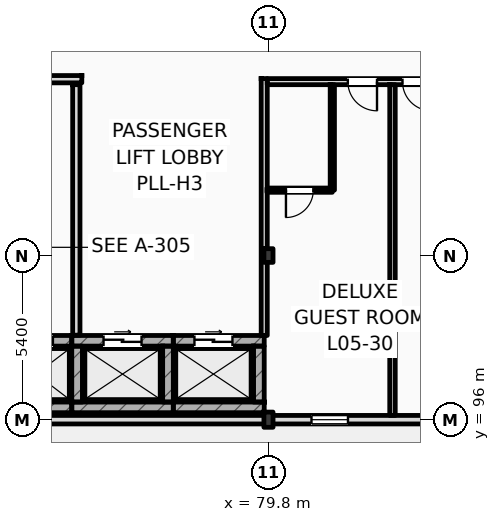
"""IFC4 building model, lengths in metres.
Left out: names, types, materials, properties, quantities, classifications, styles, units other than length and angle.
Written with IfcOpenShell. Run it as: python <this file> out.ifc"""

import sys

from ifc_helpers import new_model, si_unit, direction, frame, frame_2d, origin, origin_2d, place, context, subcontext, project, spatial, rectangle, i_section, extrude, element, fill, save


model = new_model("IFC4")
c1 = context("Model", 3, precision=1e-05, world=origin(), true_north=direction((0.0, 1.0)))
c2 = subcontext(c1, "Body", "Model", "MODEL_VIEW")
j1 = project(units=[si_unit("LENGTHUNIT", "METRE"), si_unit("PLANEANGLEUNIT", "RADIAN")], contexts=[c1])
p1 = place(None, origin())
s1 = spatial("IfcSite", under=j1, at=p1, CompositionType="ELEMENT")
p2 = place(p1, origin())
s2 = spatial("IfcBuilding", under=s1, at=p2, CompositionType="ELEMENT")
p3 = place(p2, frame((0.0, 0.0, 24.6)))
s3 = spatial("IfcBuildingStorey", under=s2, at=p3, CompositionType="ELEMENT", Elevation=24.6)
p4 = place(p3, frame((79.8, 96.0, 0.0), z_axis=(0.0, 0.0, 1.0), x_axis=(1.0, 0.0, 0.0)))
e1 = element("IfcColumn", 1, at=p4, inside=s3, PredefinedType="COLUMN", context=c2, shape_type="SweptSolid", body=[
    extrude(i_section(OverallWidth=0.3, OverallDepth=0.5, WebThickness=0.014, FlangeThickness=0.028, FilletRadius=0.027, at=origin_2d()), origin(), (0.0, 0.0, 1.0), 3.6),
])
p5 = place(p3, frame((79.8, 101.4, 0.0), z_axis=(0.0, 0.0, 1.0), x_axis=(1.0, 0.0, 0.0)))
e2 = element("IfcColumn", 2, at=p5, inside=s3, PredefinedType="COLUMN", context=c2, shape_type="SweptSolid", body=[
    extrude(i_section(OverallWidth=0.3, OverallDepth=0.45, WebThickness=0.014, FlangeThickness=0.026, FilletRadius=0.027, at=origin_2d()), origin(), (0.0, 0.0, 1.0), 3.6),
])
p6 = place(p3, frame((25.2, 96.0, 0.0), z_axis=(0.0, 0.0, 1.0), x_axis=(1.0, 0.0, 0.0)))
e3 = element("IfcWall", 3, at=p6, inside=s3, PredefinedType="STANDARD", context=c2, shape_type="SweptSolid", body=[
    extrude(rectangle(XDim=94.8, YDim=0.28, at=frame_2d((47.4, 0.0))), origin(), (0.0, 0.0, 1.0), 2.78),
])
p7 = place(p6, frame((16.539, 0.0, 0.9)))
e4 = element("IfcOpeningElement", 4, at=p7, cuts=e3, PredefinedType="OPENING", context=c2, shape_type="SweptSolid", body=[
    extrude(rectangle(XDim=1.75, YDim=1.7, at=frame_2d((0.875, 0.85))), frame((0.0, 0.15, 0.0), z_axis=(0.0, -1.0, 0.0), x_axis=(1.0, 0.0, 0.0)), (0.0, 0.0, 1.0), 0.3),
])
p8 = place(p6, frame((20.367, 0.0, 0.9)))
e5 = element("IfcOpeningElement", 5, at=p8, cuts=e3, PredefinedType="OPENING", context=c2, shape_type="SweptSolid", body=[
    extrude(rectangle(XDim=2.0, YDim=1.7, at=frame_2d((1.0, 0.85))), frame((0.0, 0.15, 0.0), z_axis=(0.0, -1.0, 0.0), x_axis=(1.0, 0.0, 0.0)), (0.0, 0.0, 1.0), 0.3),
])
p9 = place(p6, frame((24.326, 0.0, 0.9)))
e6 = element("IfcOpeningElement", 6, at=p9, cuts=e3, PredefinedType="OPENING", context=c2, shape_type="SweptSolid", body=[
    extrude(rectangle(XDim=2.3, YDim=1.7, at=frame_2d((1.15, 0.85))), frame((0.0, 0.15, 0.0), z_axis=(0.0, -1.0, 0.0), x_axis=(1.0, 0.0, 0.0)), (0.0, 0.0, 1.0), 0.3),
])
p10 = place(p6, frame((27.684, 0.0, 0.9)))
e7 = element("IfcOpeningElement", 7, at=p10, cuts=e3, PredefinedType="OPENING", context=c2, shape_type="SweptSolid", body=[
    extrude(rectangle(XDim=2.6, YDim=1.7, at=frame_2d((1.3, 0.85))), frame((0.0, 0.15, 0.0), z_axis=(0.0, -1.0, 0.0), x_axis=(1.0, 0.0, 0.0)), (0.0, 0.0, 1.0), 0.3),
])
p11 = place(p6, frame((32.083, 0.0, 0.9)))
e8 = element("IfcOpeningElement", 8, at=p11, cuts=e3, PredefinedType="OPENING", context=c2, shape_type="SweptSolid", body=[
    extrude(rectangle(XDim=2.419, YDim=1.7, at=frame_2d((1.209, 0.85))), frame((0.0, 0.15, 0.0), z_axis=(0.0, -1.0, 0.0), x_axis=(1.0, 0.0, 0.0)), (0.0, 0.0, 1.0), 0.3),
])
p12 = place(p6, frame((35.322, 0.0, 0.9)))
e9 = element("IfcOpeningElement", 9, at=p12, cuts=e3, PredefinedType="OPENING", context=c2, shape_type="SweptSolid", body=[
    extrude(rectangle(XDim=2.868, YDim=1.7, at=frame_2d((1.434, 0.85))), frame((0.0, 0.15, 0.0), z_axis=(0.0, -1.0, 0.0), x_axis=(1.0, 0.0, 0.0)), (0.0, 0.0, 1.0), 0.3),
])
p13 = place(p6, frame((56.015, 0.0, 0.9)))
e10 = element("IfcOpeningElement", 10, at=p13, cuts=e3, PredefinedType="OPENING", context=c2, shape_type="SweptSolid", body=[
    extrude(rectangle(XDim=1.2, YDim=1.7, at=frame_2d((0.6, 0.85))), frame((0.0, 0.15, 0.0), z_axis=(0.0, -1.0, 0.0), x_axis=(1.0, 0.0, 0.0)), (0.0, 0.0, 1.0), 0.3),
])
p14 = place(p6, frame((59.888, 0.0, 0.9)))
e11 = element("IfcOpeningElement", 11, at=p14, cuts=e3, PredefinedType="OPENING", context=c2, shape_type="SweptSolid", body=[
    extrude(rectangle(XDim=1.35, YDim=1.7, at=frame_2d((0.675, 0.85))), frame((0.0, 0.15, 0.0), z_axis=(0.0, -1.0, 0.0), x_axis=(1.0, 0.0, 0.0)), (0.0, 0.0, 1.0), 0.3),
])
p15 = place(p6, frame((63.799, 0.0, 0.9)))
e12 = element("IfcOpeningElement", 12, at=p15, cuts=e3, PredefinedType="OPENING", context=c2, shape_type="SweptSolid", body=[
    extrude(rectangle(XDim=1.5, YDim=1.7, at=frame_2d((0.75, 0.85))), frame((0.0, 0.15, 0.0), z_axis=(0.0, -1.0, 0.0), x_axis=(1.0, 0.0, 0.0)), (0.0, 0.0, 1.0), 0.3),
])
p16 = place(p6, frame((67.709, 0.0, 0.9)))
e13 = element("IfcOpeningElement", 13, at=p16, cuts=e3, PredefinedType="OPENING", context=c2, shape_type="SweptSolid", body=[
    extrude(rectangle(XDim=1.65, YDim=1.7, at=frame_2d((0.825, 0.85))), frame((0.0, 0.15, 0.0), z_axis=(0.0, -1.0, 0.0), x_axis=(1.0, 0.0, 0.0)), (0.0, 0.0, 1.0), 0.3),
])
p17 = place(p6, frame((71.618, 0.0, 0.9)))
e14 = element("IfcOpeningElement", 14, at=p17, cuts=e3, PredefinedType="OPENING", context=c2, shape_type="SweptSolid", body=[
    extrude(rectangle(XDim=1.8, YDim=1.7, at=frame_2d((0.9, 0.85))), frame((0.0, 0.15, 0.0), z_axis=(0.0, -1.0, 0.0), x_axis=(1.0, 0.0, 0.0)), (0.0, 0.0, 1.0), 0.3),
])
p18 = place(p6, frame((75.129, 0.0, 0.9)))
e15 = element("IfcOpeningElement", 15, at=p18, cuts=e3, PredefinedType="OPENING", context=c2, shape_type="SweptSolid", body=[
    extrude(rectangle(XDim=1.95, YDim=1.7, at=frame_2d((0.975, 0.85))), frame((0.0, 0.15, 0.0), z_axis=(0.0, -1.0, 0.0), x_axis=(1.0, 0.0, 0.0)), (0.0, 0.0, 1.0), 0.3),
])
p19 = place(p6, frame((79.439, 0.0, 0.9)))
e16 = element("IfcOpeningElement", 16, at=p19, cuts=e3, PredefinedType="OPENING", context=c2, shape_type="SweptSolid", body=[
    extrude(rectangle(XDim=2.1, YDim=1.7, at=frame_2d((1.05, 0.85))), frame((0.0, 0.15, 0.0), z_axis=(0.0, -1.0, 0.0), x_axis=(1.0, 0.0, 0.0)), (0.0, 0.0, 1.0), 0.3),
])
p20 = place(p6, frame((83.349, 0.0, 0.9)))
e17 = element("IfcOpeningElement", 17, at=p20, cuts=e3, PredefinedType="OPENING", context=c2, shape_type="SweptSolid", body=[
    extrude(rectangle(XDim=2.25, YDim=1.7, at=frame_2d((1.125, 0.85))), frame((0.0, 0.15, 0.0), z_axis=(0.0, -1.0, 0.0), x_axis=(1.0, 0.0, 0.0)), (0.0, 0.0, 1.0), 0.3),
])
p21 = place(p6, frame((87.258, 0.0, 0.9)))
e18 = element("IfcOpeningElement", 18, at=p21, cuts=e3, PredefinedType="OPENING", context=c2, shape_type="SweptSolid", body=[
    extrude(rectangle(XDim=2.4, YDim=1.7, at=frame_2d((1.2, 0.85))), frame((0.0, 0.15, 0.0), z_axis=(0.0, -1.0, 0.0), x_axis=(1.0, 0.0, 0.0)), (0.0, 0.0, 1.0), 0.3),
])
p22 = place(p6, frame((91.204, 0.0, 0.9)))
e19 = element("IfcOpeningElement", 19, at=p22, cuts=e3, PredefinedType="OPENING", context=c2, shape_type="SweptSolid", body=[
    extrude(rectangle(XDim=2.55, YDim=1.7, at=frame_2d((1.275, 0.85))), frame((0.0, 0.15, 0.0), z_axis=(0.0, -1.0, 0.0), x_axis=(1.0, 0.0, 0.0)), (0.0, 0.0, 1.0), 0.3),
])
p23 = place(p3, frame((70.64, 98.595, 0.0), z_axis=(0.0, 0.0, 1.0), x_axis=(1.0, 0.0, 0.0)))
e20 = element("IfcWall", 20, at=p23, inside=s3, PredefinedType="SHEAR", context=c2, shape_type="SweptSolid", body=[
    extrude(rectangle(XDim=2.69, YDim=0.35, at=frame_2d((1.345, 0.0))), origin(), (0.0, 0.0, 1.0), 3.34),
])
p24 = place(p23, frame((0.97, 0.0, 0.0)))
e21 = element("IfcOpeningElement", 21, at=p24, cuts=e20, PredefinedType="OPENING", context=c2, shape_type="SweptSolid", body=[
    extrude(rectangle(XDim=1.1, YDim=2.2, at=frame_2d((0.55, 1.1))), frame((0.0, 0.185, 0.0), z_axis=(0.0, -1.0, 0.0), x_axis=(1.0, 0.0, 0.0)), (0.0, 0.0, 1.0), 0.37),
])
p25 = place(p3, frame((70.64, 96.405, 0.0), z_axis=(0.0, 0.0, 1.0), x_axis=(1.0, 0.0, 0.0)))
e22 = element("IfcWall", 22, at=p25, inside=s3, PredefinedType="SHEAR", context=c2, shape_type="SweptSolid", body=[
    extrude(rectangle(XDim=2.69, YDim=0.35, at=frame_2d((1.345, 0.0))), origin(), (0.0, 0.0, 1.0), 3.34),
])
p26 = place(p3, frame((73.33, 98.595, 0.0), z_axis=(0.0, 0.0, 1.0), x_axis=(1.0, 0.0, 0.0)))
e23 = element("IfcWall", 23, at=p26, inside=s3, PredefinedType="SHEAR", context=c2, shape_type="SweptSolid", body=[
    extrude(rectangle(XDim=3.34, YDim=0.35, at=frame_2d((1.67, 0.0))), origin(), (0.0, 0.0, 1.0), 3.34),
])
p27 = place(p26, frame((1.045, 0.0, 0.0)))
e24 = element("IfcOpeningElement", 24, at=p27, cuts=e23, PredefinedType="OPENING", context=c2, shape_type="SweptSolid", body=[
    extrude(rectangle(XDim=1.25, YDim=2.25, at=frame_2d((0.625, 1.125))), frame((0.0, 0.185, 0.0), z_axis=(0.0, -1.0, 0.0), x_axis=(1.0, 0.0, 0.0)), (0.0, 0.0, 1.0), 0.37),
])
p28 = place(p3, frame((73.33, 96.405, 0.0), z_axis=(0.0, 0.0, 1.0), x_axis=(1.0, 0.0, 0.0)))
e25 = element("IfcWall", 25, at=p28, inside=s3, PredefinedType="SHEAR", context=c2, shape_type="SweptSolid", body=[
    extrude(rectangle(XDim=3.34, YDim=0.35, at=frame_2d((1.67, 0.0))), origin(), (0.0, 0.0, 1.0), 3.34),
])
for number, where, z_axis, x_axis in (
    (26, (73.505, 96.58, 0.0), (0.0, 0.0, 1.0), (0.0, 1.0, 0.0)),
    (27, (76.495, 96.58, 0.0), (0.0, 0.0, 1.0), (0.0, 1.0, 0.0)),
):
    element("IfcWall", number, at=place(p3, frame(where, z_axis=z_axis, x_axis=x_axis)), inside=s3, PredefinedType="SHEAR", context=c2, shape_type="SweptSolid", body=[
        extrude(rectangle(XDim=1.84, YDim=0.35, at=frame_2d((0.92, 0.0))), origin(), (0.0, 0.0, 1.0), 3.34),
    ])
p29 = place(p3, frame((76.67, 98.595, 0.0), z_axis=(0.0, 0.0, 1.0), x_axis=(1.0, 0.0, 0.0)))
e28 = element("IfcWall", 28, at=p29, inside=s3, PredefinedType="SHEAR", context=c2, shape_type="SweptSolid", body=[
    extrude(rectangle(XDim=2.99, YDim=0.35, at=frame_2d((1.495, 0.0))), origin(), (0.0, 0.0, 1.0), 3.34),
])
p30 = place(p29, frame((0.695, 0.0, 0.0)))
e29 = element("IfcOpeningElement", 29, at=p30, cuts=e28, PredefinedType="OPENING", context=c2, shape_type="SweptSolid", body=[
    extrude(rectangle(XDim=1.25, YDim=2.25, at=frame_2d((0.625, 1.125))), frame((0.0, 0.185, 0.0), z_axis=(0.0, -1.0, 0.0), x_axis=(1.0, 0.0, 0.0)), (0.0, 0.0, 1.0), 0.37),
])
p31 = place(p3, frame((76.67, 96.405, 0.0), z_axis=(0.0, 0.0, 1.0), x_axis=(1.0, 0.0, 0.0)))
e30 = element("IfcWall", 30, at=p31, inside=s3, PredefinedType="SHEAR", context=c2, shape_type="SweptSolid", body=[
    extrude(rectangle(XDim=2.99, YDim=0.35, at=frame_2d((1.495, 0.0))), origin(), (0.0, 0.0, 1.0), 3.34),
])
p32 = place(p3, frame((79.485, 96.58, 0.0), z_axis=(0.0, 0.0, 1.0), x_axis=(0.0, 1.0, 0.0)))
e31 = element("IfcWall", 31, at=p32, inside=s3, PredefinedType="SHEAR", context=c2, shape_type="SweptSolid", body=[
    extrude(rectangle(XDim=1.84, YDim=0.35, at=frame_2d((0.92, 0.0))), origin(), (0.0, 0.0, 1.0), 2.93),
])
p33 = place(p3, frame((73.48, 98.78, 0.0), z_axis=(0.0, 0.0, 1.0), x_axis=(0.0, 1.0, 0.0)))
e32 = element("IfcWall", 32, at=p33, inside=s3, PredefinedType="STANDARD", context=c2, shape_type="SweptSolid", body=[
    extrude(rectangle(XDim=8.24, YDim=0.24, at=frame_2d((4.12, 0.0))), origin(), (0.0, 0.0, 1.0), 3.34),
])
p34 = place(p3, frame((69.56, 107.2, 0.0), z_axis=(0.0, 0.0, 1.0), x_axis=(1.0, 0.0, 0.0)))
e33 = element("IfcWall", 33, at=p34, inside=s3, PredefinedType="STANDARD", context=c2, shape_type="SweptSolid", body=[
    extrude(rectangle(XDim=4.1, YDim=0.24, at=frame_2d((2.05, 0.0))), origin(), (0.0, 0.0, 1.0), 3.34),
])
p35 = place(p34, frame((1.3, 0.0, 0.0)))
e34 = element("IfcOpeningElement", 34, at=p35, cuts=e33, PredefinedType="OPENING", context=c2, shape_type="SweptSolid", body=[
    extrude(rectangle(XDim=1.1, YDim=2.2, at=frame_2d((0.55, 1.1))), frame((0.0, 0.13, 0.0), z_axis=(0.0, -1.0, 0.0), x_axis=(1.0, 0.0, 0.0)), (0.0, 0.0, 1.0), 0.26),
])
p36 = place(p3, frame((79.76, 107.12, 0.0), z_axis=(0.0, 0.0, 1.0), x_axis=(1.0, 0.0, 0.0)))
e35 = element("IfcWall", 35, at=p36, inside=s3, PredefinedType="PARTITIONING", context=c2, shape_type="SweptSolid", body=[
    extrude(rectangle(XDim=40.1, YDim=0.2, at=frame_2d((20.05, 0.0))), origin(), (0.0, 0.0, 1.0), 3.34),
])
p37 = place(p36, frame((2.65, 0.0, 0.0)))
e36 = element("IfcOpeningElement", 36, at=p37, cuts=e35, PredefinedType="OPENING", context=c2, shape_type="SweptSolid", body=[
    extrude(rectangle(XDim=0.96, YDim=2.2, at=frame_2d((0.48, 1.1))), frame((0.0, 0.11, 0.0), z_axis=(0.0, -1.0, 0.0), x_axis=(1.0, 0.0, 0.0)), (0.0, 0.0, 1.0), 0.22),
])
p38 = place(p36, frame((4.448, 0.0, 0.0)))
e37 = element("IfcOpeningElement", 37, at=p38, cuts=e35, PredefinedType="OPENING", context=c2, shape_type="SweptSolid", body=[
    extrude(rectangle(XDim=0.96, YDim=2.2, at=frame_2d((0.48, 1.1))), frame((0.0, 0.11, 0.0), z_axis=(0.0, -1.0, 0.0), x_axis=(1.0, 0.0, 0.0)), (0.0, 0.0, 1.0), 0.22),
])
p39 = place(p36, frame((10.583, 0.0, 0.0)))
e38 = element("IfcOpeningElement", 38, at=p39, cuts=e35, PredefinedType="OPENING", context=c2, shape_type="SweptSolid", body=[
    extrude(rectangle(XDim=0.96, YDim=2.2, at=frame_2d((0.48, 1.1))), frame((0.0, 0.11, 0.0), z_axis=(0.0, -1.0, 0.0), x_axis=(1.0, 0.0, 0.0)), (0.0, 0.0, 1.0), 0.22),
])
p40 = place(p36, frame((12.418, 0.0, 0.0)))
e39 = element("IfcOpeningElement", 39, at=p40, cuts=e35, PredefinedType="OPENING", context=c2, shape_type="SweptSolid", body=[
    extrude(rectangle(XDim=0.96, YDim=2.2, at=frame_2d((0.48, 1.1))), frame((0.0, 0.11, 0.0), z_axis=(0.0, -1.0, 0.0), x_axis=(1.0, 0.0, 0.0)), (0.0, 0.0, 1.0), 0.22),
])
p41 = place(p36, frame((18.553, 0.0, 0.0)))
e40 = element("IfcOpeningElement", 40, at=p41, cuts=e35, PredefinedType="OPENING", context=c2, shape_type="SweptSolid", body=[
    extrude(rectangle(XDim=0.96, YDim=2.2, at=frame_2d((0.48, 1.1))), frame((0.0, 0.11, 0.0), z_axis=(0.0, -1.0, 0.0), x_axis=(1.0, 0.0, 0.0)), (0.0, 0.0, 1.0), 0.22),
])
p42 = place(p36, frame((20.388, 0.0, 0.0)))
e41 = element("IfcOpeningElement", 41, at=p42, cuts=e35, PredefinedType="OPENING", context=c2, shape_type="SweptSolid", body=[
    extrude(rectangle(XDim=0.96, YDim=2.2, at=frame_2d((0.48, 1.1))), frame((0.0, 0.11, 0.0), z_axis=(0.0, -1.0, 0.0), x_axis=(1.0, 0.0, 0.0)), (0.0, 0.0, 1.0), 0.22),
])
p43 = place(p36, frame((26.523, 0.0, 0.0)))
e42 = element("IfcOpeningElement", 42, at=p43, cuts=e35, PredefinedType="OPENING", context=c2, shape_type="SweptSolid", body=[
    extrude(rectangle(XDim=0.96, YDim=2.2, at=frame_2d((0.48, 1.1))), frame((0.0, 0.11, 0.0), z_axis=(0.0, -1.0, 0.0), x_axis=(1.0, 0.0, 0.0)), (0.0, 0.0, 1.0), 0.22),
])
p44 = place(p36, frame((28.358, 0.0, 0.0)))
e43 = element("IfcOpeningElement", 43, at=p44, cuts=e35, PredefinedType="OPENING", context=c2, shape_type="SweptSolid", body=[
    extrude(rectangle(XDim=0.96, YDim=2.2, at=frame_2d((0.48, 1.1))), frame((0.0, 0.11, 0.0), z_axis=(0.0, -1.0, 0.0), x_axis=(1.0, 0.0, 0.0)), (0.0, 0.0, 1.0), 0.22),
])
p45 = place(p36, frame((34.493, 0.0, 0.0)))
e44 = element("IfcOpeningElement", 44, at=p45, cuts=e35, PredefinedType="OPENING", context=c2, shape_type="SweptSolid", body=[
    extrude(rectangle(XDim=0.96, YDim=2.2, at=frame_2d((0.48, 1.1))), frame((0.0, 0.11, 0.0), z_axis=(0.0, -1.0, 0.0), x_axis=(1.0, 0.0, 0.0)), (0.0, 0.0, 1.0), 0.22),
])
p46 = place(p36, frame((36.364, 0.0, 0.0)))
e45 = element("IfcOpeningElement", 45, at=p46, cuts=e35, PredefinedType="OPENING", context=c2, shape_type="SweptSolid", body=[
    extrude(rectangle(XDim=0.96, YDim=2.2, at=frame_2d((0.48, 1.1))), frame((0.0, 0.11, 0.0), z_axis=(0.0, -1.0, 0.0), x_axis=(1.0, 0.0, 0.0)), (0.0, 0.0, 1.0), 0.22),
])
p47 = place(p3, frame((79.66, 98.77, 0.0), z_axis=(0.0, 0.0, 1.0), x_axis=(0.0, 1.0, 0.0)))
e46 = element("IfcWall", 46, at=p47, inside=s3, PredefinedType="PARTITIONING", context=c2, shape_type="SweptSolid", body=[
    extrude(rectangle(XDim=8.45, YDim=0.2, at=frame_2d((4.225, 0.0))), origin(), (0.0, 0.0, 1.0), 2.93),
])
p48 = place(p3, frame((83.879, 96.14, 0.0), z_axis=(0.0, 0.0, 1.0), x_axis=(0.0, 1.0, 0.0)))
e47 = element("IfcWall", 47, at=p48, inside=s3, PredefinedType="PARTITIONING", context=c2, shape_type="SweptSolid", body=[
    extrude(rectangle(XDim=10.88, YDim=0.18, at=frame_2d((5.44, 0.0))), origin(), (0.0, 0.0, 1.0), 3.34),
])
p49 = place(p3, frame((81.9, 103.55, 0.0), z_axis=(0.0, 0.0, 1.0), x_axis=(0.0, 1.0, 0.0)))
e48 = element("IfcWall", 48, at=p49, inside=s3, PredefinedType="PARTITIONING", context=c2, shape_type="SweptSolid", body=[
    extrude(rectangle(XDim=3.47, YDim=0.14, at=frame_2d((1.735, 0.0))), origin(), (0.0, 0.0, 1.0), 3.34),
])
p50 = place(p3, frame((79.75, 103.55, 0.0), z_axis=(0.0, 0.0, 1.0), x_axis=(1.0, 0.0, 0.0)))
e49 = element("IfcWall", 49, at=p50, inside=s3, PredefinedType="PARTITIONING", context=c2, shape_type="SweptSolid", body=[
    extrude(rectangle(XDim=2.15, YDim=0.14, at=frame_2d((1.075, 0.0))), origin(), (0.0, 0.0, 1.0), 3.34),
])
p51 = place(p50, frame((0.625, 0.0, 0.0)))
e50 = element("IfcOpeningElement", 50, at=p51, cuts=e49, PredefinedType="OPENING", context=c2, shape_type="SweptSolid", body=[
    extrude(rectangle(XDim=0.9, YDim=2.1, at=frame_2d((0.45, 1.05))), frame((0.0, 0.08, 0.0), z_axis=(0.0, -1.0, 0.0), x_axis=(1.0, 0.0, 0.0)), (0.0, 0.0, 1.0), 0.16),
])
p52 = place(p13, origin())
e51 = element("IfcWindow", 51, at=p52, inside=s3, PartitioningType="DOUBLE_PANEL_VERTICAL", PredefinedType="WINDOW", context=c2, shape_type="SweptSolid", body=[
    extrude(rectangle(XDim=1.2, YDim=1.7, at=frame_2d((0.6, 0.85))), frame((0.0, 0.03, 0.0), z_axis=(0.0, -1.0, 0.0), x_axis=(1.0, 0.0, 0.0)), (0.0, 0.0, 1.0), 0.06),
])
fill(e10, e51)
p53 = place(p24, origin())
e52 = element("IfcDoor", 52, at=p53, inside=s3, OperationType="SLIDING_TO_LEFT", PredefinedType="DOOR", context=c2, shape_type="SweptSolid", body=[
    extrude(rectangle(XDim=1.1, YDim=2.2, at=frame_2d((0.55, 1.1))), frame((0.0, 0.025, 0.0), z_axis=(0.0, -1.0, 0.0), x_axis=(1.0, 0.0, 0.0)), (0.0, 0.0, 1.0), 0.05),
])
fill(e21, e52)
p54 = place(p27, origin())
e53 = element("IfcDoor", 53, at=p54, inside=s3, OperationType="SLIDING_TO_LEFT", PredefinedType="DOOR", context=c2, shape_type="SweptSolid", body=[
    extrude(rectangle(XDim=1.25, YDim=2.25, at=frame_2d((0.625, 1.125))), frame((0.0, 0.025, 0.0), z_axis=(0.0, -1.0, 0.0), x_axis=(1.0, 0.0, 0.0)), (0.0, 0.0, 1.0), 0.05),
])
fill(e24, e53)
p55 = place(p30, origin())
e54 = element("IfcDoor", 54, at=p55, inside=s3, OperationType="SLIDING_TO_LEFT", PredefinedType="DOOR", context=c2, shape_type="SweptSolid", body=[
    extrude(rectangle(XDim=1.25, YDim=2.25, at=frame_2d((0.625, 1.125))), frame((0.0, 0.025, 0.0), z_axis=(0.0, -1.0, 0.0), x_axis=(1.0, 0.0, 0.0)), (0.0, 0.0, 1.0), 0.05),
])
fill(e29, e54)
p56 = place(p37, frame((0.96, 0.0, 0.0), z_axis=(0.0, 0.0, 1.0), x_axis=(-1.0, 0.0, 0.0)))
e55 = element("IfcDoor", 55, at=p56, inside=s3, OperationType="SINGLE_SWING_RIGHT", PredefinedType="DOOR", context=c2, shape_type="SweptSolid", body=[
    extrude(rectangle(XDim=0.96, YDim=2.2, at=frame_2d((0.48, 1.1))), frame((0.0, 0.025, 0.0), z_axis=(0.0, -1.0, 0.0), x_axis=(1.0, 0.0, 0.0)), (0.0, 0.0, 1.0), 0.05),
])
fill(e36, e55)
p57 = place(p51, frame((0.9, 0.0, 0.0), z_axis=(0.0, 0.0, 1.0), x_axis=(-1.0, 0.0, 0.0)))
e56 = element("IfcDoor", 56, at=p57, inside=s3, OperationType="SINGLE_SWING_LEFT", PredefinedType="DOOR", context=c2, shape_type="SweptSolid", body=[
    extrude(rectangle(XDim=0.9, YDim=2.1, at=frame_2d((0.45, 1.05))), frame((0.0, 0.025, 0.0), z_axis=(0.0, -1.0, 0.0), x_axis=(1.0, 0.0, 0.0)), (0.0, 0.0, 1.0), 0.05),
])
fill(e50, e56)
p58 = place(p38, frame((0.96, 0.0, 0.0), z_axis=(0.0, 0.0, 1.0), x_axis=(-1.0, 0.0, 0.0)))
e57 = element("IfcDoor", 57, at=p58, inside=s3, OperationType="SINGLE_SWING_RIGHT", PredefinedType="DOOR", context=c2, shape_type="SweptSolid", body=[
    extrude(rectangle(XDim=0.96, YDim=2.2, at=frame_2d((0.48, 1.1))), frame((0.0, 0.025, 0.0), z_axis=(0.0, -1.0, 0.0), x_axis=(1.0, 0.0, 0.0)), (0.0, 0.0, 1.0), 0.05),
])
fill(e37, e57)
save(model, sys.argv[1])
